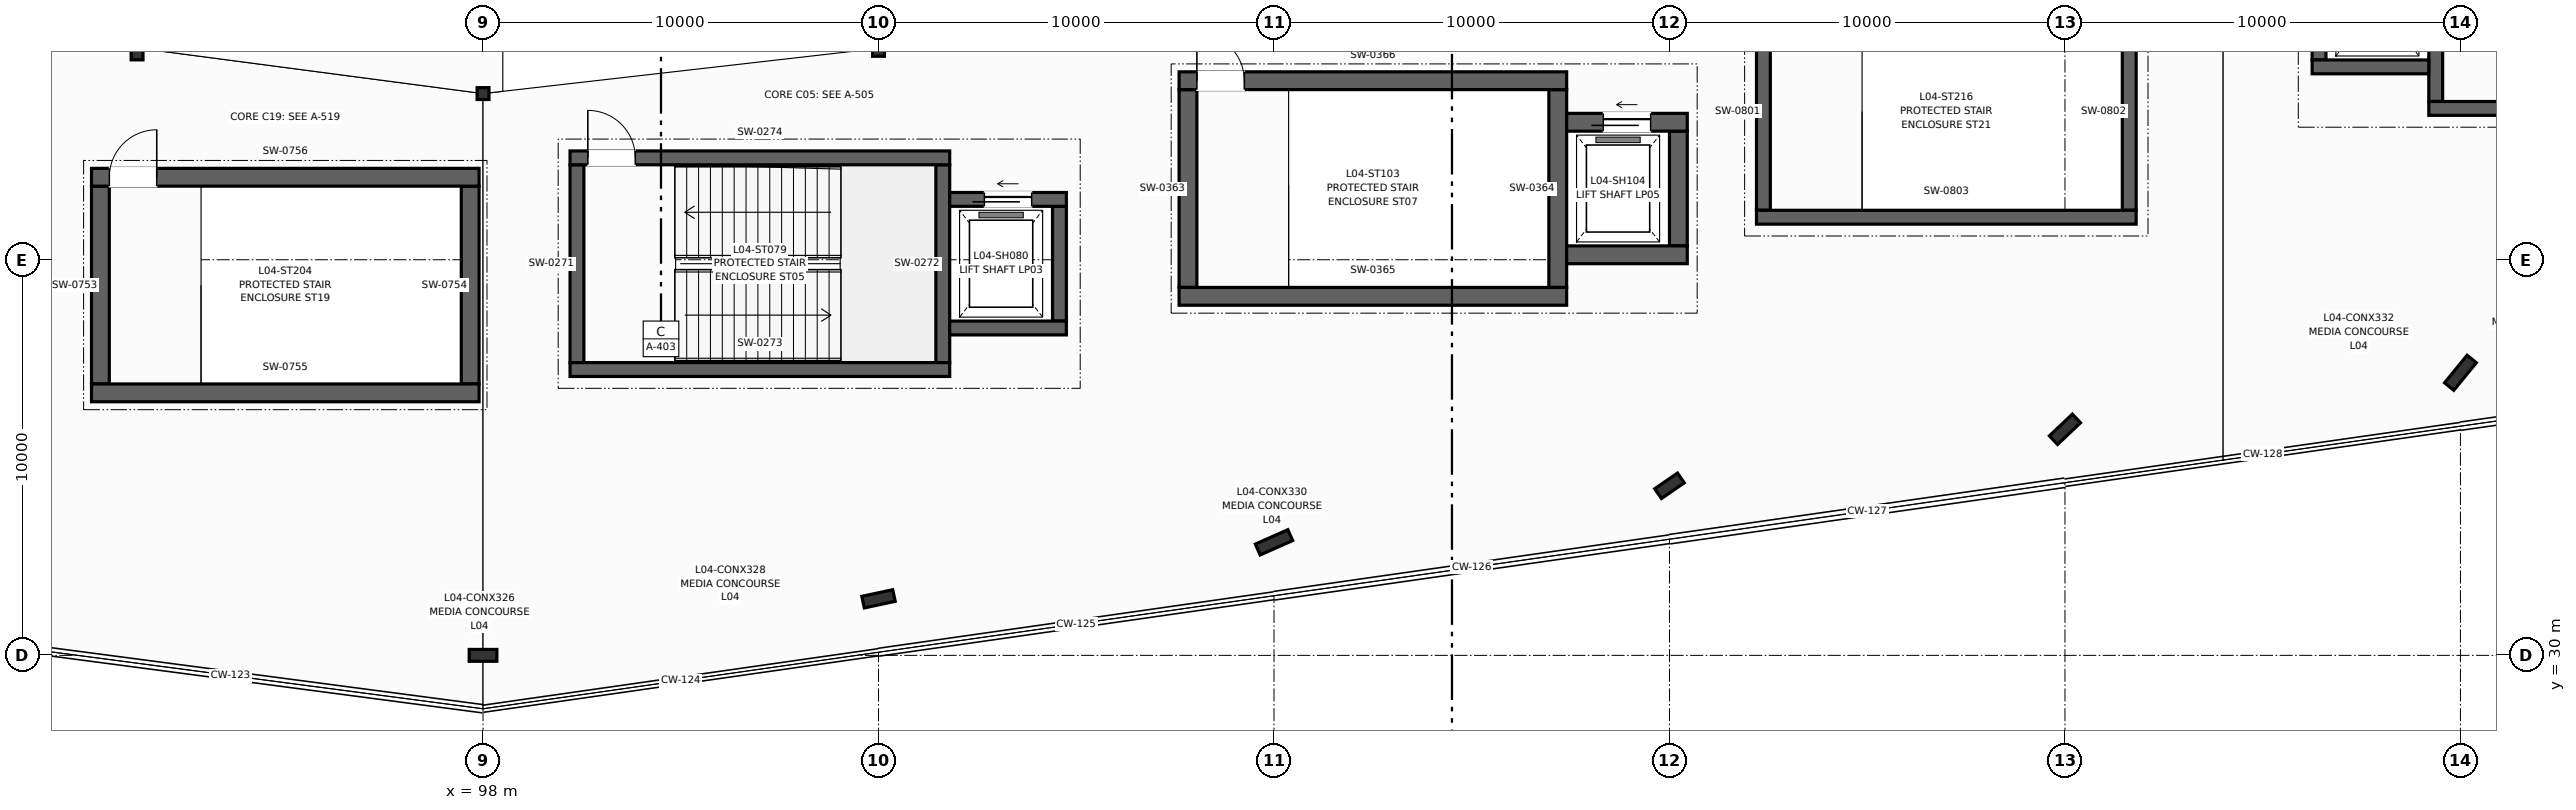
"""IFC4 building model, lengths in metres.
Left out: names, types, materials, properties, quantities, classifications, styles, units other than length and angle.
Written with IfcOpenShell. Run it as: python <this file> out.ifc"""

import sys

from ifc_helpers import new_model, si_unit, direction, frame, frame_2d, origin, origin_2d, place, context, subcontext, project, spatial, rectangle, i_section, extrude, element, fill, save


model = new_model("IFC4")
c1 = context("Model", 3, precision=1e-05, world=origin(), true_north=direction((0.0, 1.0)))
c2 = subcontext(c1, "Body", "Model", "MODEL_VIEW")
j1 = project(units=[si_unit("LENGTHUNIT", "METRE"), si_unit("PLANEANGLEUNIT", "RADIAN")], contexts=[c1])
p1 = place(None, origin())
s1 = spatial("IfcSite", under=j1, at=p1, CompositionType="ELEMENT")
p2 = place(p1, origin())
s2 = spatial("IfcBuilding", under=s1, at=p2, CompositionType="ELEMENT")
p3 = place(p2, frame((0.0, 0.0, 18.0)))
s3 = spatial("IfcBuildingStorey", under=s2, at=p3, CompositionType="ELEMENT", Elevation=18.0)
p4 = place(p3, frame((89.252, 45.352, 0.0), z_axis=(0.0, 0.0, 1.0), x_axis=(1.0, 0.0, 0.0)))
e1 = element("IfcColumn", 1, at=p4, inside=s3, PredefinedType="COLUMN", context=c2, shape_type="SweptSolid", body=[
    extrude(i_section(OverallWidth=0.3, OverallDepth=0.6, WebThickness=0.015, FlangeThickness=0.03, at=origin_2d()), origin(), (0.0, 0.0, 1.0), 4.5),
])
p5 = place(p3, frame((98.0, 44.2, 0.0), z_axis=(0.0, 0.0, 1.0), x_axis=(1.0, 0.0, 0.0)))
e2 = element("IfcColumn", 2, at=p5, inside=s3, PredefinedType="COLUMN", context=c2, shape_type="SweptSolid", body=[
    extrude(i_section(OverallWidth=0.3, OverallDepth=0.3, WebThickness=0.011, FlangeThickness=0.019, at=origin_2d()), origin(), (0.0, 0.0, 1.0), 4.5),
])
p6 = place(p3, frame((108.0, 45.343, 0.0), z_axis=(0.0, 0.0, 1.0), x_axis=(1.0, 0.0, 0.0)))
e3 = element("IfcColumn", 3, at=p6, inside=s3, PredefinedType="COLUMN", context=c2, shape_type="SweptSolid", body=[
    extrude(i_section(OverallWidth=0.3, OverallDepth=0.4, WebThickness=0.013, FlangeThickness=0.024, at=origin_2d()), origin(), (0.0, 0.0, 1.0), 4.5),
])
p7 = place(p3, frame((98.0, 30.0, 0.0), z_axis=(0.0, 0.0, 1.0), x_axis=(0.0, 1.0, 0.0)))
e4 = element("IfcColumn", 4, at=p7, inside=s3, PredefinedType="COLUMN", context=c2, shape_type="SweptSolid", body=[
    extrude(i_section(OverallWidth=0.3, OverallDepth=0.7, WebThickness=0.017, FlangeThickness=0.032, at=origin_2d()), origin(), (0.0, 0.0, 1.0), 4.5),
])
p8 = place(p3, frame((108.0, 31.429, 0.0), z_axis=(0.0, 0.0, 1.0), x_axis=(-0.209618562904, 0.977783236759, 0.0)))
e5 = element("IfcColumn", 5, at=p8, inside=s3, PredefinedType="COLUMN", context=c2, shape_type="SweptSolid", body=[
    extrude(i_section(OverallWidth=0.3, OverallDepth=0.8, WebThickness=0.018, FlangeThickness=0.033, at=origin_2d()), origin(), (0.0, 0.0, 1.0), 4.5),
])
p9 = place(p3, frame((118.0, 32.857, 0.0), z_axis=(0.0, 0.0, 1.0), x_axis=(-0.40514158678, 0.914253955234, 0.0)))
e6 = element("IfcColumn", 6, at=p9, inside=s3, PredefinedType="COLUMN", context=c2, shape_type="SweptSolid", body=[
    extrude(i_section(OverallWidth=0.3, OverallDepth=0.9, WebThickness=0.019, FlangeThickness=0.035, at=origin_2d()), origin(), (0.0, 0.0, 1.0), 4.5),
])
p10 = place(p3, frame((128.0, 34.286, 0.0), z_axis=(0.0, 0.0, 1.0), x_axis=(-0.566406236925, 0.824126188622, 0.0)))
e7 = element("IfcColumn", 7, at=p10, inside=s3, PredefinedType="COLUMN", context=c2, shape_type="SweptSolid", body=[
    extrude(i_section(OverallWidth=0.3, OverallDepth=0.7, WebThickness=0.017, FlangeThickness=0.032, at=origin_2d()), origin(), (0.0, 0.0, 1.0), 4.5),
])
p11 = place(p3, frame((138.0, 35.714, 0.0), z_axis=(0.0, 0.0, 1.0), x_axis=(-0.687087510804, 0.726574670971, 0.0)))
e8 = element("IfcColumn", 8, at=p11, inside=s3, PredefinedType="COLUMN", context=c2, shape_type="SweptSolid", body=[
    extrude(i_section(OverallWidth=0.3, OverallDepth=0.8, WebThickness=0.018, FlangeThickness=0.033, at=origin_2d()), origin(), (0.0, 0.0, 1.0), 4.5),
])
p12 = place(p3, frame((148.0, 37.143, 0.0), z_axis=(0.0, 0.0, 1.0), x_axis=(-0.773840209727, 0.633380872628, 0.0)))
e9 = element("IfcColumn", 9, at=p12, inside=s3, PredefinedType="COLUMN", context=c2, shape_type="SweptSolid", body=[
    extrude(i_section(OverallWidth=0.3, OverallDepth=0.9, WebThickness=0.019, FlangeThickness=0.035, at=origin_2d()), origin(), (0.0, 0.0, 1.0), 4.5),
])
for number, where, z_axis, x_axis in (
    (10, (100.375, 37.4, 0.0), (0.0, 0.0, 1.0), (0.0, 1.0, 0.0)),
    (11, (109.625, 37.4, 0.0), (0.0, 0.0, 1.0), (0.0, 1.0, 0.0)),
):
    element("IfcWall", number, at=place(p3, frame(where, z_axis=z_axis, x_axis=x_axis)), inside=s3, PredefinedType="SHEAR", context=c2, shape_type="SweptSolid", body=[
        extrude(rectangle(XDim=5.0, YDim=0.35, at=frame_2d((2.5, 0.0))), origin(), (0.0, 0.0, 1.0), 4.25),
    ])
p13 = place(p3, frame((100.2, 37.225, 0.0), z_axis=(0.0, 0.0, 1.0), x_axis=(1.0, 0.0, 0.0)))
e12 = element("IfcWall", 12, at=p13, inside=s3, PredefinedType="SHEAR", context=c2, shape_type="SweptSolid", body=[
    extrude(rectangle(XDim=9.6, YDim=0.35, at=frame_2d((4.8, 0.0))), origin(), (0.0, 0.0, 1.0), 4.25),
])
p14 = place(p3, frame((100.2, 42.575, 0.0), z_axis=(0.0, 0.0, 1.0), x_axis=(1.0, 0.0, 0.0)))
e13 = element("IfcWall", 13, at=p14, inside=s3, PredefinedType="SHEAR", context=c2, shape_type="SweptSolid", body=[
    extrude(rectangle(XDim=9.6, YDim=0.35, at=frame_2d((4.8, 0.0))), origin(), (0.0, 0.0, 1.0), 4.25),
])
p15 = place(p14, frame((0.45, 0.0, 0.0)))
e14 = element("IfcOpeningElement", 14, at=p15, cuts=e13, PredefinedType="OPENING", context=c2, shape_type="SweptSolid", body=[
    extrude(rectangle(XDim=1.2, YDim=2.2, at=frame_2d((0.6, 1.1))), frame((0.0, 0.185, 0.0), z_axis=(0.0, -1.0, 0.0), x_axis=(1.0, 0.0, 0.0)), (0.0, 0.0, 1.0), 0.37),
])
p16 = place(p3, frame((112.575, 38.45, 0.0), z_axis=(0.0, 0.0, 1.0), x_axis=(0.0, 1.0, 0.0)))
e15 = element("IfcWall", 15, at=p16, inside=s3, PredefinedType="SHEAR", context=c2, shape_type="SweptSolid", body=[
    extrude(rectangle(XDim=2.9, YDim=0.35, at=frame_2d((1.45, 0.0))), origin(), (0.0, 0.0, 1.0), 4.25),
])
p17 = place(p3, frame((109.8, 38.275, 0.0), z_axis=(0.0, 0.0, 1.0), x_axis=(1.0, 0.0, 0.0)))
e16 = element("IfcWall", 16, at=p17, inside=s3, PredefinedType="SHEAR", context=c2, shape_type="SweptSolid", body=[
    extrude(rectangle(XDim=2.95, YDim=0.35, at=frame_2d((1.475, 0.0))), origin(), (0.0, 0.0, 1.0), 4.25),
])
p18 = place(p3, frame((109.8, 41.525, 0.0), z_axis=(0.0, 0.0, 1.0), x_axis=(1.0, 0.0, 0.0)))
e17 = element("IfcWall", 17, at=p18, inside=s3, PredefinedType="SHEAR", context=c2, shape_type="SweptSolid", body=[
    extrude(rectangle(XDim=2.95, YDim=0.35, at=frame_2d((1.475, 0.0))), origin(), (0.0, 0.0, 1.0), 4.25),
])
p19 = place(p18, frame((0.875, 0.0, 0.0)))
e18 = element("IfcOpeningElement", 18, at=p19, cuts=e17, PredefinedType="OPENING", context=c2, shape_type="SweptSolid", body=[
    extrude(rectangle(XDim=1.2, YDim=2.2, at=frame_2d((0.6, 1.1))), frame((0.0, 0.185, 0.0), z_axis=(0.0, -1.0, 0.0), x_axis=(1.0, 0.0, 0.0)), (0.0, 0.0, 1.0), 0.37),
])
for number, where, z_axis, x_axis in (
    (19, (115.825, 39.3, 0.0), (0.0, 0.0, 1.0), (0.0, 1.0, 0.0)),
    (20, (125.175, 39.3, 0.0), (0.0, 0.0, 1.0), (0.0, 1.0, 0.0)),
):
    element("IfcWall", number, at=place(p3, frame(where, z_axis=z_axis, x_axis=x_axis)), inside=s3, PredefinedType="SHEAR", context=c2, shape_type="SweptSolid", body=[
        extrude(rectangle(XDim=5.0, YDim=0.45, at=frame_2d((2.5, 0.0))), origin(), (0.0, 0.0, 1.0), 4.25),
    ])
p20 = place(p3, frame((115.6, 39.075, 0.0), z_axis=(0.0, 0.0, 1.0), x_axis=(1.0, 0.0, 0.0)))
e21 = element("IfcWall", 21, at=p20, inside=s3, PredefinedType="SHEAR", context=c2, shape_type="SweptSolid", body=[
    extrude(rectangle(XDim=9.8, YDim=0.45, at=frame_2d((4.9, 0.0))), origin(), (0.0, 0.0, 1.0), 4.25),
])
p21 = place(p3, frame((115.6, 44.525, 0.0), z_axis=(0.0, 0.0, 1.0), x_axis=(1.0, 0.0, 0.0)))
e22 = element("IfcWall", 22, at=p21, inside=s3, PredefinedType="SHEAR", context=c2, shape_type="SweptSolid", body=[
    extrude(rectangle(XDim=9.8, YDim=0.45, at=frame_2d((4.9, 0.0))), origin(), (0.0, 0.0, 1.0), 4.25),
])
p22 = place(p21, frame((0.45, 0.0, 0.0)))
e23 = element("IfcOpeningElement", 23, at=p22, cuts=e22, PredefinedType="OPENING", context=c2, shape_type="SweptSolid", body=[
    extrude(rectangle(XDim=1.2, YDim=2.2, at=frame_2d((0.6, 1.1))), frame((0.0, 0.235, 0.0), z_axis=(0.0, -1.0, 0.0), x_axis=(1.0, 0.0, 0.0)), (0.0, 0.0, 1.0), 0.47),
])
p23 = place(p3, frame((128.225, 40.35, 0.0), z_axis=(0.0, 0.0, 1.0), x_axis=(0.0, 1.0, 0.0)))
e24 = element("IfcWall", 24, at=p23, inside=s3, PredefinedType="SHEAR", context=c2, shape_type="SweptSolid", body=[
    extrude(rectangle(XDim=2.9, YDim=0.45, at=frame_2d((1.45, 0.0))), origin(), (0.0, 0.0, 1.0), 4.25),
])
p24 = place(p3, frame((125.4, 40.125, 0.0), z_axis=(0.0, 0.0, 1.0), x_axis=(1.0, 0.0, 0.0)))
e25 = element("IfcWall", 25, at=p24, inside=s3, PredefinedType="SHEAR", context=c2, shape_type="SweptSolid", body=[
    extrude(rectangle(XDim=3.05, YDim=0.45, at=frame_2d((1.525, 0.0))), origin(), (0.0, 0.0, 1.0), 4.25),
])
p25 = place(p3, frame((125.4, 43.475, 0.0), z_axis=(0.0, 0.0, 1.0), x_axis=(1.0, 0.0, 0.0)))
e26 = element("IfcWall", 26, at=p25, inside=s3, PredefinedType="SHEAR", context=c2, shape_type="SweptSolid", body=[
    extrude(rectangle(XDim=3.05, YDim=0.45, at=frame_2d((1.525, 0.0))), origin(), (0.0, 0.0, 1.0), 4.25),
])
p26 = place(p25, frame((0.925, 0.0, 0.0)))
e27 = element("IfcOpeningElement", 27, at=p26, cuts=e26, PredefinedType="OPENING", context=c2, shape_type="SweptSolid", body=[
    extrude(rectangle(XDim=1.2, YDim=2.2, at=frame_2d((0.6, 1.1))), frame((0.0, 0.235, 0.0), z_axis=(0.0, -1.0, 0.0), x_axis=(1.0, 0.0, 0.0)), (0.0, 0.0, 1.0), 0.47),
])
p27 = place(p3, frame((147.375, 44.0, 0.0), z_axis=(0.0, 0.0, 1.0), x_axis=(0.0, 1.0, 0.0)))
e28 = element("IfcWall", 28, at=p27, inside=s3, PredefinedType="SHEAR", context=c2, shape_type="SweptSolid", body=[
    extrude(rectangle(XDim=5.0, YDim=0.35, at=frame_2d((2.5, 0.0))), origin(), (0.0, 0.0, 1.0), 4.25),
])
p28 = place(p3, frame((147.2, 43.825, 0.0), z_axis=(0.0, 0.0, 1.0), x_axis=(1.0, 0.0, 0.0)))
e29 = element("IfcWall", 29, at=p28, inside=s3, PredefinedType="SHEAR", context=c2, shape_type="SweptSolid", body=[
    extrude(rectangle(XDim=9.6, YDim=0.35, at=frame_2d((4.8, 0.0))), origin(), (0.0, 0.0, 1.0), 4.25),
])
p29 = place(p3, frame((144.425, 45.05, 0.0), z_axis=(0.0, 0.0, 1.0), x_axis=(0.0, 1.0, 0.0)))
e30 = element("IfcWall", 30, at=p29, inside=s3, PredefinedType="SHEAR", context=c2, shape_type="SweptSolid", body=[
    extrude(rectangle(XDim=2.9, YDim=0.35, at=frame_2d((1.45, 0.0))), origin(), (0.0, 0.0, 1.0), 4.25),
])
p30 = place(p3, frame((144.25, 44.875, 0.0), z_axis=(0.0, 0.0, 1.0), x_axis=(1.0, 0.0, 0.0)))
e31 = element("IfcWall", 31, at=p30, inside=s3, PredefinedType="SHEAR", context=c2, shape_type="SweptSolid", body=[
    extrude(rectangle(XDim=2.95, YDim=0.35, at=frame_2d((1.475, 0.0))), origin(), (0.0, 0.0, 1.0), 4.25),
])
for number, where, z_axis, x_axis in (
    (32, (88.325, 36.86, 0.0), (0.0, 0.0, 1.0), (0.0, 1.0, 0.0)),
    (33, (97.675, 36.86, 0.0), (0.0, 0.0, 1.0), (0.0, 1.0, 0.0)),
):
    element("IfcWall", number, at=place(p3, frame(where, z_axis=z_axis, x_axis=x_axis)), inside=s3, PredefinedType="SHEAR", context=c2, shape_type="SweptSolid", body=[
        extrude(rectangle(XDim=5.0, YDim=0.45, at=frame_2d((2.5, 0.0))), origin(), (0.0, 0.0, 1.0), 4.25),
    ])
p31 = place(p3, frame((88.1, 36.635, 0.0), z_axis=(0.0, 0.0, 1.0), x_axis=(1.0, 0.0, 0.0)))
e34 = element("IfcWall", 34, at=p31, inside=s3, PredefinedType="SHEAR", context=c2, shape_type="SweptSolid", body=[
    extrude(rectangle(XDim=9.8, YDim=0.45, at=frame_2d((4.9, 0.0))), origin(), (0.0, 0.0, 1.0), 4.25),
])
p32 = place(p3, frame((88.1, 42.085, 0.0), z_axis=(0.0, 0.0, 1.0), x_axis=(1.0, 0.0, 0.0)))
e35 = element("IfcWall", 35, at=p32, inside=s3, PredefinedType="SHEAR", context=c2, shape_type="SweptSolid", body=[
    extrude(rectangle(XDim=9.8, YDim=0.45, at=frame_2d((4.9, 0.0))), origin(), (0.0, 0.0, 1.0), 4.25),
])
p33 = place(p32, frame((0.45, 0.0, 0.0)))
e36 = element("IfcOpeningElement", 36, at=p33, cuts=e35, PredefinedType="OPENING", context=c2, shape_type="SweptSolid", body=[
    extrude(rectangle(XDim=1.2, YDim=2.2, at=frame_2d((0.6, 1.1))), frame((0.0, 0.235, 0.0), z_axis=(0.0, -1.0, 0.0), x_axis=(1.0, 0.0, 0.0)), (0.0, 0.0, 1.0), 0.47),
])
for number, where, z_axis, x_axis in (
    (37, (130.375, 41.25, 0.0), (0.0, 0.0, 1.0), (0.0, 1.0, 0.0)),
    (38, (139.625, 41.25, 0.0), (0.0, 0.0, 1.0), (0.0, 1.0, 0.0)),
):
    element("IfcWall", number, at=place(p3, frame(where, z_axis=z_axis, x_axis=x_axis)), inside=s3, PredefinedType="SHEAR", context=c2, shape_type="SweptSolid", body=[
        extrude(rectangle(XDim=5.0, YDim=0.35, at=frame_2d((2.5, 0.0))), origin(), (0.0, 0.0, 1.0), 4.25),
    ])
p34 = place(p3, frame((130.2, 41.075, 0.0), z_axis=(0.0, 0.0, 1.0), x_axis=(1.0, 0.0, 0.0)))
e39 = element("IfcWall", 39, at=p34, inside=s3, PredefinedType="SHEAR", context=c2, shape_type="SweptSolid", body=[
    extrude(rectangle(XDim=9.6, YDim=0.35, at=frame_2d((4.8, 0.0))), origin(), (0.0, 0.0, 1.0), 4.25),
])
p35 = place(p15, origin())
e40 = element("IfcDoor", 40, at=p35, inside=s3, OperationType="SINGLE_SWING_LEFT", PredefinedType="DOOR", context=c2, shape_type="SweptSolid", body=[
    extrude(rectangle(XDim=1.2, YDim=2.2, at=frame_2d((0.6, 1.1))), frame((0.0, 0.025, 0.0), z_axis=(0.0, -1.0, 0.0), x_axis=(1.0, 0.0, 0.0)), (0.0, 0.0, 1.0), 0.05),
])
fill(e14, e40)
p36 = place(p19, origin())
e41 = element("IfcDoor", 41, at=p36, inside=s3, OperationType="SLIDING_TO_LEFT", PredefinedType="DOOR", context=c2, shape_type="SweptSolid", body=[
    extrude(rectangle(XDim=1.2, YDim=2.2, at=frame_2d((0.6, 1.1))), frame((0.0, 0.025, 0.0), z_axis=(0.0, -1.0, 0.0), x_axis=(1.0, 0.0, 0.0)), (0.0, 0.0, 1.0), 0.05),
])
fill(e18, e41)
p37 = place(p22, origin())
e42 = element("IfcDoor", 42, at=p37, inside=s3, OperationType="SINGLE_SWING_LEFT", PredefinedType="DOOR", context=c2, shape_type="SweptSolid", body=[
    extrude(rectangle(XDim=1.2, YDim=2.2, at=frame_2d((0.6, 1.1))), frame((0.0, 0.025, 0.0), z_axis=(0.0, -1.0, 0.0), x_axis=(1.0, 0.0, 0.0)), (0.0, 0.0, 1.0), 0.05),
])
fill(e23, e42)
p38 = place(p26, origin())
e43 = element("IfcDoor", 43, at=p38, inside=s3, OperationType="SLIDING_TO_LEFT", PredefinedType="DOOR", context=c2, shape_type="SweptSolid", body=[
    extrude(rectangle(XDim=1.2, YDim=2.2, at=frame_2d((0.6, 1.1))), frame((0.0, 0.025, 0.0), z_axis=(0.0, -1.0, 0.0), x_axis=(1.0, 0.0, 0.0)), (0.0, 0.0, 1.0), 0.05),
])
fill(e27, e43)
p39 = place(p33, origin())
e44 = element("IfcDoor", 44, at=p39, inside=s3, OperationType="SINGLE_SWING_RIGHT", PredefinedType="DOOR", context=c2, shape_type="SweptSolid", body=[
    extrude(rectangle(XDim=1.2, YDim=2.2, at=frame_2d((0.6, 1.1))), frame((0.0, 0.025, 0.0), z_axis=(0.0, -1.0, 0.0), x_axis=(1.0, 0.0, 0.0)), (0.0, 0.0, 1.0), 0.05),
])
fill(e36, e44)
save(model, sys.argv[1])
